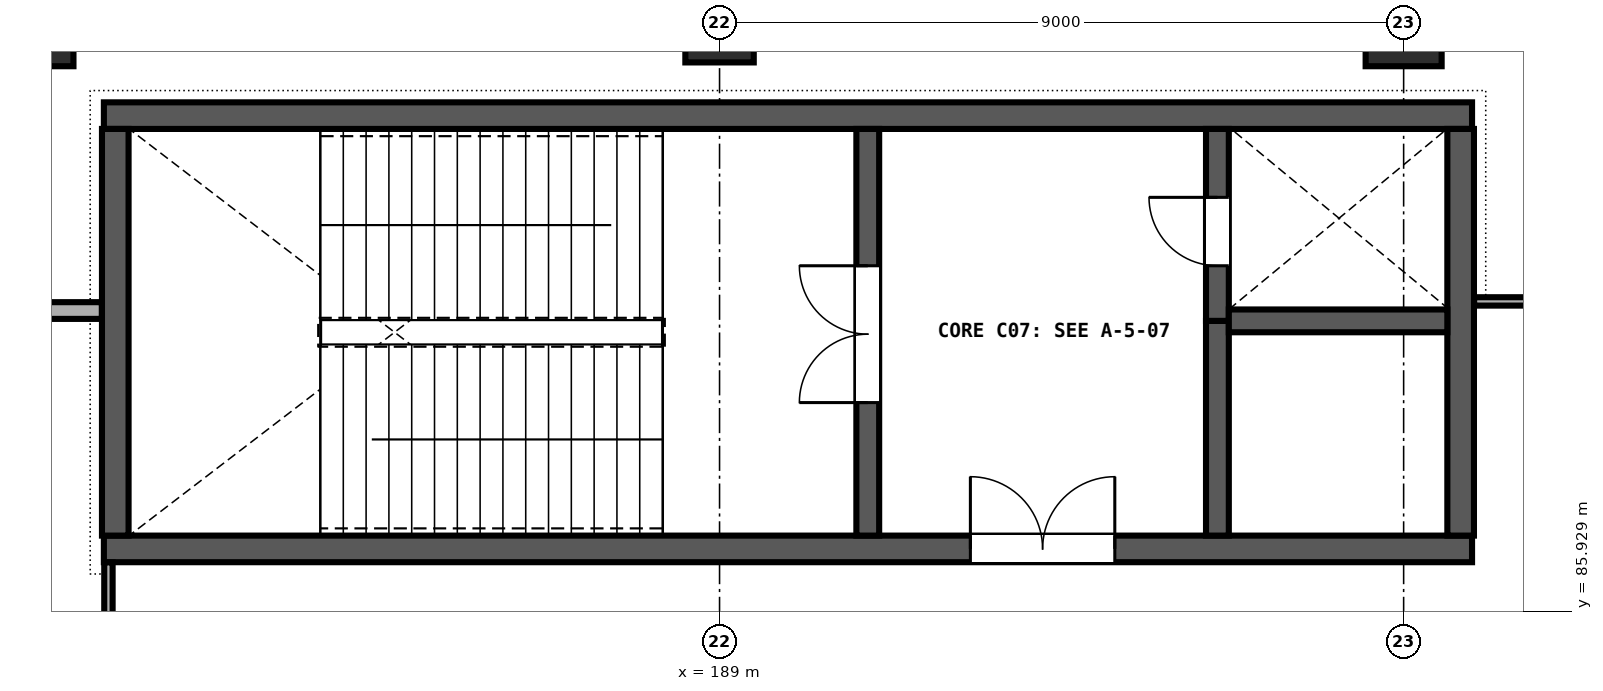
"""IFC4 building model, lengths in metres.
Left out: names, types, materials, properties, quantities, classifications, styles, units other than length and angle.
Written with IfcOpenShell. Run it as: python <this file> out.ifc"""

import sys

from ifc_helpers import new_model, si_unit, direction, frame, frame_2d, origin, origin_2d, place, context, subcontext, project, spatial, rectangle, extrude, element, fill, save


model = new_model("IFC4")
c1 = context("Model", 3, precision=1e-05, world=origin(), true_north=direction((0.0, 1.0)))
c2 = subcontext(c1, "Body", "Model", "MODEL_VIEW")
j1 = project(units=[si_unit("LENGTHUNIT", "METRE"), si_unit("PLANEANGLEUNIT", "RADIAN")], contexts=[c1])
p1 = place(None, origin())
s1 = spatial("IfcSite", under=j1, at=p1, CompositionType="ELEMENT")
p2 = place(p1, origin())
s2 = spatial("IfcBuilding", under=s1, at=p2, CompositionType="ELEMENT")
p3 = place(p2, frame((0.0, 0.0, 4.8)))
s3 = spatial("IfcBuildingStorey", under=s2, at=p3, CompositionType="ELEMENT", Elevation=4.8)
p4 = place(p3, frame((180.0, 93.6, 0.0), z_axis=(0.0, 0.0, 1.0), x_axis=(1.0, 0.0, 0.0)))
e1 = element("IfcColumn", 1, at=p4, inside=s3, PredefinedType="COLUMN", context=c2, shape_type="SweptSolid", body=[
    extrude(rectangle(XDim=1.0, YDim=1.0, at=origin_2d()), origin(), (0.0, 0.0, 1.0), 4.8),
])
p5 = place(p3, frame((189.0, 93.6, 0.0), z_axis=(0.0, 0.0, 1.0), x_axis=(1.0, 0.0, 0.0)))
e2 = element("IfcColumn", 2, at=p5, inside=s3, PredefinedType="COLUMN", context=c2, shape_type="SweptSolid", body=[
    extrude(rectangle(XDim=0.9, YDim=0.9, at=origin_2d()), origin(), (0.0, 0.0, 1.0), 4.8),
])
p6 = place(p3, frame((198.0, 93.6, 0.0), z_axis=(0.0, 0.0, 1.0), x_axis=(1.0, 0.0, 0.0)))
e3 = element("IfcColumn", 3, at=p6, inside=s3, PredefinedType="COLUMN", context=c2, shape_type="SweptSolid", body=[
    extrude(rectangle(XDim=1.0, YDim=1.0, at=origin_2d()), origin(), (0.0, 0.0, 1.0), 4.8),
])
p7 = place(p3, frame((180.9, 86.75, 0.0), z_axis=(0.0, 0.0, 1.0), x_axis=(1.0, 0.0, 0.0)))
e4 = element("IfcWall", 4, at=p7, inside=s3, PredefinedType="SHEAR", context=c2, shape_type="SweptSolid", body=[
    extrude(rectangle(XDim=18.0, YDim=0.35, at=frame_2d((9.0, 0.0))), origin(), (0.0, 0.0, 1.0), 4.52),
])
p8 = place(p7, frame((11.4, 0.0, 0.0)))
e5 = element("IfcOpeningElement", 5, at=p8, cuts=e4, PredefinedType="OPENING", context=c2, shape_type="SweptSolid", body=[
    extrude(rectangle(XDim=1.9, YDim=2.25, at=frame_2d((0.95, 1.125))), frame((0.0, 0.185, 0.0), z_axis=(0.0, -1.0, 0.0), x_axis=(1.0, 0.0, 0.0)), (0.0, 0.0, 1.0), 0.37),
])
p9 = place(p3, frame((198.9, 92.45, 0.0), z_axis=(0.0, 0.0, 1.0), x_axis=(-1.0, 0.0, 0.0)))
e6 = element("IfcWall", 6, at=p9, inside=s3, PredefinedType="SHEAR", context=c2, shape_type="SweptSolid", body=[
    extrude(rectangle(XDim=18.0, YDim=0.35, at=frame_2d((9.0, 0.0))), origin(), (0.0, 0.0, 1.0), 4.52),
])
for number, where, z_axis, x_axis in (
    (7, (181.05, 92.275, 0.0), (0.0, 0.0, 1.0), (0.0, -1.0, 0.0)),
    (8, (198.75, 86.925, 0.0), (0.0, 0.0, 1.0), (0.0, 1.0, 0.0)),
):
    element("IfcWall", number, at=place(p3, frame(where, z_axis=z_axis, x_axis=x_axis)), inside=s3, PredefinedType="SHEAR", context=c2, shape_type="SweptSolid", body=[
        extrude(rectangle(XDim=5.35, YDim=0.35, at=frame_2d((2.675, 0.0))), origin(), (0.0, 0.0, 1.0), 4.52),
    ])
p10 = place(p3, frame((190.95, 86.925, 0.0), z_axis=(0.0, 0.0, 1.0), x_axis=(0.0, 1.0, 0.0)))
e9 = element("IfcWall", 9, at=p10, inside=s3, PredefinedType="SHEAR", context=c2, shape_type="SweptSolid", body=[
    extrude(rectangle(XDim=5.35, YDim=0.3, at=frame_2d((2.675, 0.0))), origin(), (0.0, 0.0, 1.0), 4.52),
])
p11 = place(p10, frame((1.75, 0.0, 0.0)))
e10 = element("IfcOpeningElement", 10, at=p11, cuts=e9, PredefinedType="OPENING", context=c2, shape_type="SweptSolid", body=[
    extrude(rectangle(XDim=1.8, YDim=2.25, at=frame_2d((0.9, 1.125))), frame((0.0, 0.16, 0.0), z_axis=(0.0, -1.0, 0.0), x_axis=(1.0, 0.0, 0.0)), (0.0, 0.0, 1.0), 0.32),
])
p12 = place(p3, frame((195.55, 86.925, 0.0), z_axis=(0.0, 0.0, 1.0), x_axis=(0.0, 1.0, 0.0)))
e11 = element("IfcWall", 11, at=p12, inside=s3, PredefinedType="SHEAR", context=c2, shape_type="SweptSolid", body=[
    extrude(rectangle(XDim=2.825, YDim=0.3, at=frame_2d((1.413, 0.0))), origin(), (0.0, 0.0, 1.0), 4.52),
])
p13 = place(p3, frame((195.55, 89.75, 0.0), z_axis=(0.0, 0.0, 1.0), x_axis=(0.0, 1.0, 0.0)))
e12 = element("IfcWall", 12, at=p13, inside=s3, PredefinedType="SHEAR", context=c2, shape_type="SweptSolid", body=[
    extrude(rectangle(XDim=2.525, YDim=0.3, at=frame_2d((1.262, 0.0))), origin(), (0.0, 0.0, 1.0), 4.52),
])
p14 = place(p13, frame((0.725, 0.0, 0.0)))
e13 = element("IfcOpeningElement", 13, at=p14, cuts=e12, PredefinedType="OPENING", context=c2, shape_type="SweptSolid", body=[
    extrude(rectangle(XDim=0.9, YDim=2.1, at=frame_2d((0.45, 1.05))), frame((0.0, 0.16, 0.0), z_axis=(0.0, -1.0, 0.0), x_axis=(1.0, 0.0, 0.0)), (0.0, 0.0, 1.0), 0.32),
])
p15 = place(p3, frame((195.7, 89.75, 0.0), z_axis=(0.0, 0.0, 1.0), x_axis=(1.0, 0.0, 0.0)))
e14 = element("IfcWall", 14, at=p15, inside=s3, PredefinedType="SHEAR", context=c2, shape_type="SweptSolid", body=[
    extrude(rectangle(XDim=2.875, YDim=0.3, at=frame_2d((1.438, 0.0))), origin(), (0.0, 0.0, 1.0), 4.52),
])
p16 = place(p3, frame((200.94, 90.006, 0.0), z_axis=(0.0, 0.0, 1.0), x_axis=(-1.0, 0.0, 0.0)))
e15 = element("IfcWall", 15, at=p16, inside=s3, PredefinedType="PARTITIONING", context=c2, shape_type="SweptSolid", body=[
    extrude(rectangle(XDim=2.013, YDim=0.11, at=frame_2d((1.006, 0.0))), origin(), (0.0, 0.0, 1.0), 3.28),
])
p17 = place(p3, frame((180.873, 89.886, 0.0), z_axis=(0.0, 0.0, 1.0), x_axis=(-1.0, 0.0, 0.0)))
e16 = element("IfcWall", 16, at=p17, inside=s3, PredefinedType="PARTITIONING", context=c2, shape_type="SweptSolid", body=[
    extrude(rectangle(XDim=2.253, YDim=0.22, at=frame_2d((1.126, 0.0))), origin(), (0.0, 0.0, 1.0), 3.28),
])
p18 = place(p3, frame((180.96, 86.573, 0.0), z_axis=(0.0, 0.0, 1.0), x_axis=(0.0, -1.0, 0.0)))
e17 = element("IfcWall", 17, at=p18, inside=s3, PredefinedType="PARTITIONING", context=c2, shape_type="SweptSolid", body=[
    extrude(rectangle(XDim=2.903, YDim=0.11, at=frame_2d((1.452, 0.0))), origin(), (0.0, 0.0, 1.0), 3.28),
])
p19 = place(p11, origin())
e18 = element("IfcDoor", 18, at=p19, inside=s3, OperationType="DOUBLE_DOOR_SINGLE_SWING", PredefinedType="DOOR", context=c2, shape_type="SweptSolid", body=[
    extrude(rectangle(XDim=1.8, YDim=2.25, at=frame_2d((0.9, 1.125))), frame((0.0, 0.025, 0.0), z_axis=(0.0, -1.0, 0.0), x_axis=(1.0, 0.0, 0.0)), (0.0, 0.0, 1.0), 0.05),
])
fill(e10, e18)
p20 = place(p14, origin())
e19 = element("IfcDoor", 19, at=p20, inside=s3, OperationType="SINGLE_SWING_RIGHT", PredefinedType="DOOR", context=c2, shape_type="SweptSolid", body=[
    extrude(rectangle(XDim=0.9, YDim=2.1, at=frame_2d((0.45, 1.05))), frame((0.0, 0.025, 0.0), z_axis=(0.0, -1.0, 0.0), x_axis=(1.0, 0.0, 0.0)), (0.0, 0.0, 1.0), 0.05),
])
fill(e13, e19)
p21 = place(p8, origin())
e20 = element("IfcDoor", 20, at=p21, inside=s3, OperationType="DOUBLE_DOOR_SINGLE_SWING", PredefinedType="DOOR", context=c2, shape_type="SweptSolid", body=[
    extrude(rectangle(XDim=1.9, YDim=2.25, at=frame_2d((0.95, 1.125))), frame((0.0, 0.025, 0.0), z_axis=(0.0, -1.0, 0.0), x_axis=(1.0, 0.0, 0.0)), (0.0, 0.0, 1.0), 0.05),
])
fill(e5, e20)
save(model, sys.argv[1])
